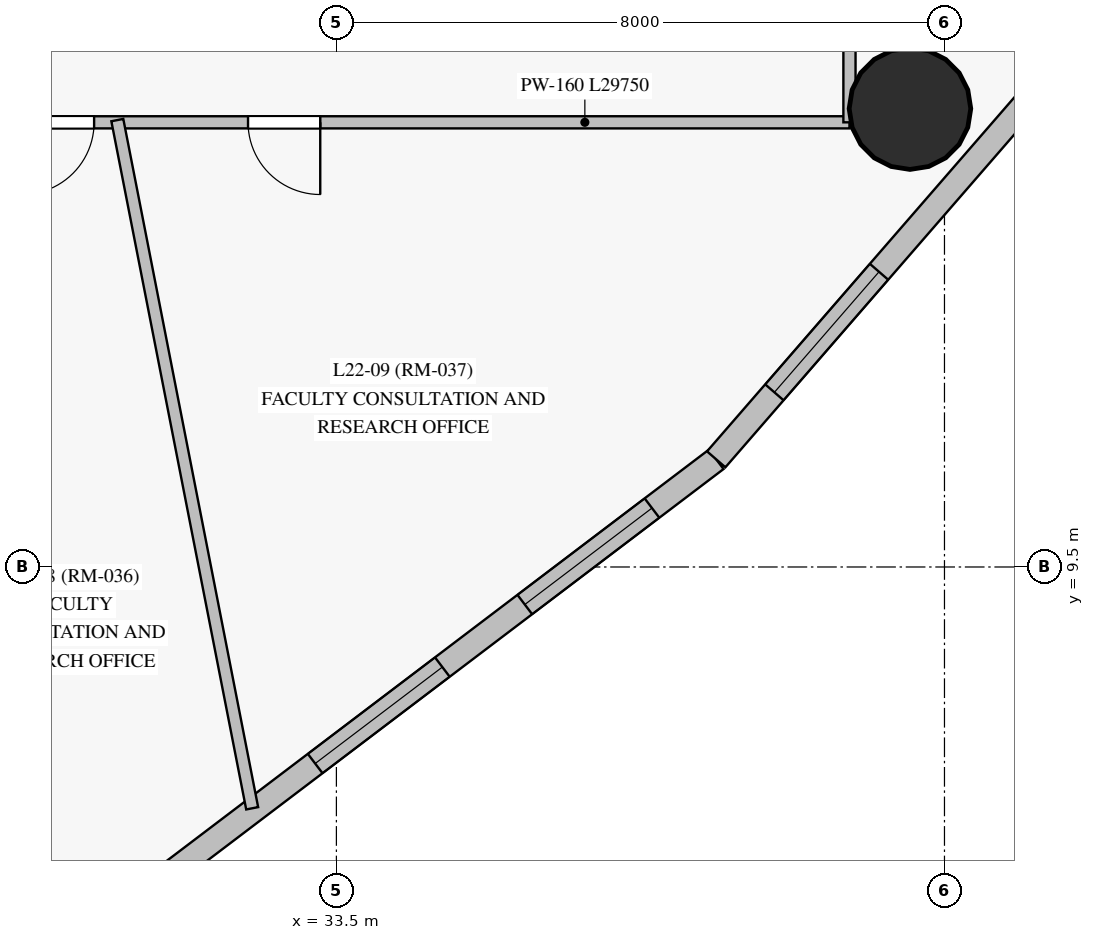
"""IFC4 building model, lengths in metres.
Left out: names, types, materials, properties, quantities, classifications, styles, units other than length and angle.
Written with IfcOpenShell. Run it as: python <this file> out.ifc"""

import sys

from ifc_helpers import new_model, si_unit, direction, frame, frame_2d, origin, origin_with_axes, origin_2d, place, context, subcontext, project, spatial, rectangle, circle, extrude, source, transform, mapped, element, fill, save


model = new_model("IFC4")
c1 = context("Model", 3, precision=1e-05, world=origin(), true_north=direction((0.0, 1.0)))
c2 = subcontext(c1, "Body", "Model", "MODEL_VIEW")
j1 = project(units=[si_unit("LENGTHUNIT", "METRE"), si_unit("PLANEANGLEUNIT", "RADIAN")], contexts=[c1])
p1 = place(None, origin())
s1 = spatial("IfcSite", under=j1, at=p1, CompositionType="ELEMENT")
p2 = place(p1, origin())
s2 = spatial("IfcBuilding", under=s1, at=p2, CompositionType="ELEMENT")
p3 = place(p2, frame((0.0, 0.0, 84.1)))
s3 = spatial("IfcBuildingStorey", under=s2, at=p3, CompositionType="ELEMENT", Elevation=84.1)
m1 = source(origin_with_axes(), c2, "Body", "SweptSolid", [
    extrude(circle(Radius=0.8, at=origin_2d()), origin(), (0.0, 0.0, 1.0), 3.6),
])
p4 = place(p3, frame((41.046, 15.53, 0.0), z_axis=(0.0, 0.0, 1.0), x_axis=(1.0, 0.0, 0.0)))
e1 = element("IfcColumn", 1, at=p4, inside=s3, PredefinedType="COLUMN", context=c2, shape_type="MappedRepresentation", body=[
    mapped(m1, transform((0.0, 0.0, 0.0), scale=1.0)),
])
p5 = place(p3, frame((26.544, 1.85, 0.0), z_axis=(0.0, 0.0, 1.0), x_axis=(0.796740715511, 0.604321298852, 0.0)))
e2 = element("IfcWall", 2, at=p5, inside=s3, PredefinedType="SOLIDWALL", context=c2, shape_type="SweptSolid", body=[
    extrude(rectangle(XDim=15.002, YDim=0.32, at=frame_2d((7.501, 0.0))), origin(), (0.0, 0.0, 1.0), 3.325),
])
p6 = place(p5, frame((3.46, 0.0, 0.85)))
e3 = element("IfcOpeningElement", 3, at=p6, cuts=e2, PredefinedType="OPENING", context=c2, shape_type="SweptSolid", body=[
    extrude(rectangle(XDim=2.1, YDim=1.95, at=frame_2d((1.05, 0.975))), frame((0.0, 0.17, 0.0), z_axis=(0.0, -1.0, 0.0), x_axis=(1.0, 0.0, 0.0)), (0.0, 0.0, 1.0), 0.34),
])
p7 = place(p5, frame((8.38, 0.0, 0.85)))
e4 = element("IfcOpeningElement", 4, at=p7, cuts=e2, PredefinedType="OPENING", context=c2, shape_type="SweptSolid", body=[
    extrude(rectangle(XDim=2.1, YDim=1.95, at=frame_2d((1.05, 0.975))), frame((0.0, 0.17, 0.0), z_axis=(0.0, -1.0, 0.0), x_axis=(1.0, 0.0, 0.0)), (0.0, 0.0, 1.0), 0.34),
])
p8 = place(p5, frame((11.842, 0.0, 0.85)))
e5 = element("IfcOpeningElement", 5, at=p8, cuts=e2, PredefinedType="OPENING", context=c2, shape_type="SweptSolid", body=[
    extrude(rectangle(XDim=2.1, YDim=1.95, at=frame_2d((1.05, 0.975))), frame((0.0, 0.17, 0.0), z_axis=(0.0, -1.0, 0.0), x_axis=(1.0, 0.0, 0.0)), (0.0, 0.0, 1.0), 0.34),
])
p9 = place(p3, frame((38.497, 10.916, 0.0), z_axis=(0.0, 0.0, 1.0), x_axis=(0.655526512459, 0.755172160148, 0.0)))
e6 = element("IfcWall", 6, at=p9, inside=s3, PredefinedType="SOLIDWALL", context=c2, shape_type="SweptSolid", body=[
    extrude(rectangle(XDim=10.43, YDim=0.32, at=frame_2d((5.215, 0.0))), origin(), (0.0, 0.0, 1.0), 3.325),
])
p10 = place(p9, frame((1.167, 0.0, 0.85)))
e7 = element("IfcOpeningElement", 7, at=p10, cuts=e6, PredefinedType="OPENING", context=c2, shape_type="SweptSolid", body=[
    extrude(rectangle(XDim=2.1, YDim=1.95, at=frame_2d((1.05, 0.975))), frame((0.0, 0.17, 0.0), z_axis=(0.0, -1.0, 0.0), x_axis=(1.0, 0.0, 0.0)), (0.0, 0.0, 1.0), 0.34),
])
p11 = place(p9, frame((7.103, 0.0, 0.85)))
e8 = element("IfcOpeningElement", 8, at=p11, cuts=e6, PredefinedType="OPENING", context=c2, shape_type="SweptSolid", body=[
    extrude(rectangle(XDim=2.1, YDim=1.95, at=frame_2d((1.05, 0.975))), frame((0.0, 0.17, 0.0), z_axis=(0.0, -1.0, 0.0), x_axis=(1.0, 0.0, 0.0)), (0.0, 0.0, 1.0), 0.34),
])
p12 = place(p3, frame((40.25, 15.35, 0.0), z_axis=(0.0, 0.0, 1.0), x_axis=(-1.0, 0.0, 0.0)))
e9 = element("IfcWall", 9, at=p12, inside=s3, PredefinedType="PARTITIONING", context=c2, shape_type="SweptSolid", body=[
    extrude(rectangle(XDim=29.75, YDim=0.16, at=frame_2d((14.875, 0.0))), origin(), (0.0, 0.0, 1.0), 2.675),
])
p13 = place(p12, frame((25.988, 0.0, 0.0)))
e10 = element("IfcOpeningElement", 10, at=p13, cuts=e9, PredefinedType="OPENING", context=c2, shape_type="SweptSolid", body=[
    extrude(rectangle(XDim=0.96, YDim=2.15, at=frame_2d((0.48, 1.075))), frame((0.0, 0.09, 0.0), z_axis=(0.0, -1.0, 0.0), x_axis=(1.0, 0.0, 0.0)), (0.0, 0.0, 1.0), 0.18),
])
p14 = place(p12, frame((21.798, 0.0, 0.0)))
e11 = element("IfcOpeningElement", 11, at=p14, cuts=e9, PredefinedType="OPENING", context=c2, shape_type="SweptSolid", body=[
    extrude(rectangle(XDim=0.95, YDim=2.15, at=frame_2d((0.475, 1.075))), frame((0.0, 0.09, 0.0), z_axis=(0.0, -1.0, 0.0), x_axis=(1.0, 0.0, 0.0)), (0.0, 0.0, 1.0), 0.18),
])
p15 = place(p12, frame((18.272, 0.0, 0.0)))
e12 = element("IfcOpeningElement", 12, at=p15, cuts=e9, PredefinedType="OPENING", context=c2, shape_type="SweptSolid", body=[
    extrude(rectangle(XDim=0.95, YDim=2.15, at=frame_2d((0.475, 1.075))), frame((0.0, 0.09, 0.0), z_axis=(0.0, -1.0, 0.0), x_axis=(1.0, 0.0, 0.0)), (0.0, 0.0, 1.0), 0.18),
])
p16 = place(p12, frame((15.977, 0.0, 0.0)))
e13 = element("IfcOpeningElement", 13, at=p16, cuts=e9, PredefinedType="OPENING", context=c2, shape_type="SweptSolid", body=[
    extrude(rectangle(XDim=0.95, YDim=2.15, at=frame_2d((0.475, 1.075))), frame((0.0, 0.09, 0.0), z_axis=(0.0, -1.0, 0.0), x_axis=(1.0, 0.0, 0.0)), (0.0, 0.0, 1.0), 0.18),
])
p17 = place(p12, frame((14.21, 0.0, 0.0)))
e14 = element("IfcOpeningElement", 14, at=p17, cuts=e9, PredefinedType="OPENING", context=c2, shape_type="SweptSolid", body=[
    extrude(rectangle(XDim=0.95, YDim=2.15, at=frame_2d((0.475, 1.075))), frame((0.0, 0.09, 0.0), z_axis=(0.0, -1.0, 0.0), x_axis=(1.0, 0.0, 0.0)), (0.0, 0.0, 1.0), 0.18),
])
p18 = place(p12, frame((9.938, 0.0, 0.0)))
e15 = element("IfcOpeningElement", 15, at=p18, cuts=e9, PredefinedType="OPENING", context=c2, shape_type="SweptSolid", body=[
    extrude(rectangle(XDim=0.95, YDim=2.15, at=frame_2d((0.475, 1.075))), frame((0.0, 0.09, 0.0), z_axis=(0.0, -1.0, 0.0), x_axis=(1.0, 0.0, 0.0)), (0.0, 0.0, 1.0), 0.18),
])
p19 = place(p12, frame((6.962, 0.0, 0.0)))
e16 = element("IfcOpeningElement", 16, at=p19, cuts=e9, PredefinedType="OPENING", context=c2, shape_type="SweptSolid", body=[
    extrude(rectangle(XDim=0.95, YDim=2.15, at=frame_2d((0.475, 1.075))), frame((0.0, 0.09, 0.0), z_axis=(0.0, -1.0, 0.0), x_axis=(1.0, 0.0, 0.0)), (0.0, 0.0, 1.0), 0.18),
])
p20 = place(p3, frame((40.25, 37.65, 0.0), z_axis=(0.0, 0.0, 1.0), x_axis=(0.0, -1.0, 0.0)))
e17 = element("IfcWall", 17, at=p20, inside=s3, PredefinedType="PARTITIONING", context=c2, shape_type="SweptSolid", body=[
    extrude(rectangle(XDim=22.3, YDim=0.16, at=frame_2d((11.15, 0.0))), origin(), (0.0, 0.0, 1.0), 2.725),
])
p21 = place(p20, frame((16.25, 0.0, 0.0)))
e18 = element("IfcOpeningElement", 18, at=p21, cuts=e17, PredefinedType="OPENING", context=c2, shape_type="SweptSolid", body=[
    extrude(rectangle(XDim=0.95, YDim=2.15, at=frame_2d((0.475, 1.075))), frame((0.0, 0.09, 0.0), z_axis=(0.0, -1.0, 0.0), x_axis=(1.0, 0.0, 0.0)), (0.0, 0.0, 1.0), 0.18),
])
p22 = place(p20, frame((11.165, 0.0, 0.0)))
e19 = element("IfcOpeningElement", 19, at=p22, cuts=e17, PredefinedType="OPENING", context=c2, shape_type="SweptSolid", body=[
    extrude(rectangle(XDim=0.95, YDim=2.15, at=frame_2d((0.475, 1.075))), frame((0.0, 0.09, 0.0), z_axis=(0.0, -1.0, 0.0), x_axis=(1.0, 0.0, 0.0)), (0.0, 0.0, 1.0), 0.18),
])
p23 = place(p20, frame((9.513, 0.0, 0.0)))
e20 = element("IfcOpeningElement", 20, at=p23, cuts=e17, PredefinedType="OPENING", context=c2, shape_type="SweptSolid", body=[
    extrude(rectangle(XDim=0.95, YDim=2.15, at=frame_2d((0.475, 1.075))), frame((0.0, 0.09, 0.0), z_axis=(0.0, -1.0, 0.0), x_axis=(1.0, 0.0, 0.0)), (0.0, 0.0, 1.0), 0.18),
])
p24 = place(p20, frame((6.94, 0.0, 0.0)))
e21 = element("IfcOpeningElement", 21, at=p24, cuts=e17, PredefinedType="OPENING", context=c2, shape_type="SweptSolid", body=[
    extrude(rectangle(XDim=0.95, YDim=2.15, at=frame_2d((0.475, 1.075))), frame((0.0, 0.09, 0.0), z_axis=(0.0, -1.0, 0.0), x_axis=(1.0, 0.0, 0.0)), (0.0, 0.0, 1.0), 0.18),
])
p25 = place(p20, frame((3.677, 0.0, 0.0)))
e22 = element("IfcOpeningElement", 22, at=p25, cuts=e17, PredefinedType="OPENING", context=c2, shape_type="SweptSolid", body=[
    extrude(rectangle(XDim=0.95, YDim=2.15, at=frame_2d((0.475, 1.075))), frame((0.0, 0.09, 0.0), z_axis=(0.0, -1.0, 0.0), x_axis=(1.0, 0.0, 0.0)), (0.0, 0.0, 1.0), 0.18),
])
p26 = place(p20, frame((0.862, 0.0, 0.0)))
e23 = element("IfcOpeningElement", 23, at=p26, cuts=e17, PredefinedType="OPENING", context=c2, shape_type="SweptSolid", body=[
    extrude(rectangle(XDim=0.95, YDim=2.15, at=frame_2d((0.475, 1.075))), frame((0.0, 0.09, 0.0), z_axis=(0.0, -1.0, 0.0), x_axis=(1.0, 0.0, 0.0)), (0.0, 0.0, 1.0), 0.18),
])
p27 = place(p3, frame((30.618, 15.379, 0.0), z_axis=(0.0, 0.0, 1.0), x_axis=(0.192298041078, -0.981336569887, 0.0)))
e24 = element("IfcWall", 24, at=p27, inside=s3, PredefinedType="PARTITIONING", context=c2, shape_type="SweptSolid", body=[
    extrude(rectangle(XDim=9.226, YDim=0.16, at=frame_2d((4.613, 0.0))), origin(), (0.0, 0.0, 1.0), 3.325),
])
m2 = source(origin_with_axes(), c2, "Body", "SweptSolid", [
    extrude(rectangle(XDim=2.1, YDim=1.95, at=frame_2d((1.05, 0.975))), frame((0.0, 0.03, 0.0), z_axis=(0.0, -1.0, 0.0), x_axis=(1.0, 0.0, 0.0)), (0.0, 0.0, 1.0), 0.06),
])
p28 = place(p7, origin())
e25 = element("IfcWindow", 25, at=p28, inside=s3, PartitioningType="SINGLE_PANEL", PredefinedType="WINDOW", context=c2, shape_type="MappedRepresentation", body=[
    mapped(m2, transform((0.0, 0.0, 0.0), scale=1.0)),
])
fill(e4, e25)
p29 = place(p8, origin())
e26 = element("IfcWindow", 26, at=p29, inside=s3, PartitioningType="SINGLE_PANEL", PredefinedType="WINDOW", context=c2, shape_type="MappedRepresentation", body=[
    mapped(m2, transform((0.0, 0.0, 0.0), scale=1.0)),
])
fill(e5, e26)
p30 = place(p10, origin())
e27 = element("IfcWindow", 27, at=p30, inside=s3, PartitioningType="SINGLE_PANEL", PredefinedType="WINDOW", context=c2, shape_type="MappedRepresentation", body=[
    mapped(m2, transform((0.0, 0.0, 0.0), scale=1.0)),
])
fill(e7, e27)
m3 = source(origin_with_axes(), c2, "Body", "SweptSolid", [
    extrude(rectangle(XDim=0.95, YDim=2.15, at=frame_2d((0.475, 1.075))), frame((0.0, 0.025, 0.0), z_axis=(0.0, -1.0, 0.0), x_axis=(1.0, 0.0, 0.0)), (0.0, 0.0, 1.0), 0.05),
])
p31 = place(p18, origin())
e28 = element("IfcDoor", 28, at=p31, inside=s3, OperationType="SINGLE_SWING_RIGHT", PredefinedType="DOOR", context=c2, shape_type="MappedRepresentation", body=[
    mapped(m3, transform((0.0, 0.0, 0.0), scale=1.0)),
])
fill(e15, e28)
p32 = place(p19, origin())
e29 = element("IfcDoor", 29, at=p32, inside=s3, OperationType="SINGLE_SWING_LEFT", PredefinedType="DOOR", context=c2, shape_type="MappedRepresentation", body=[
    mapped(m3, transform((0.0, 0.0, 0.0), scale=1.0)),
])
fill(e16, e29)
save(model, sys.argv[1])
